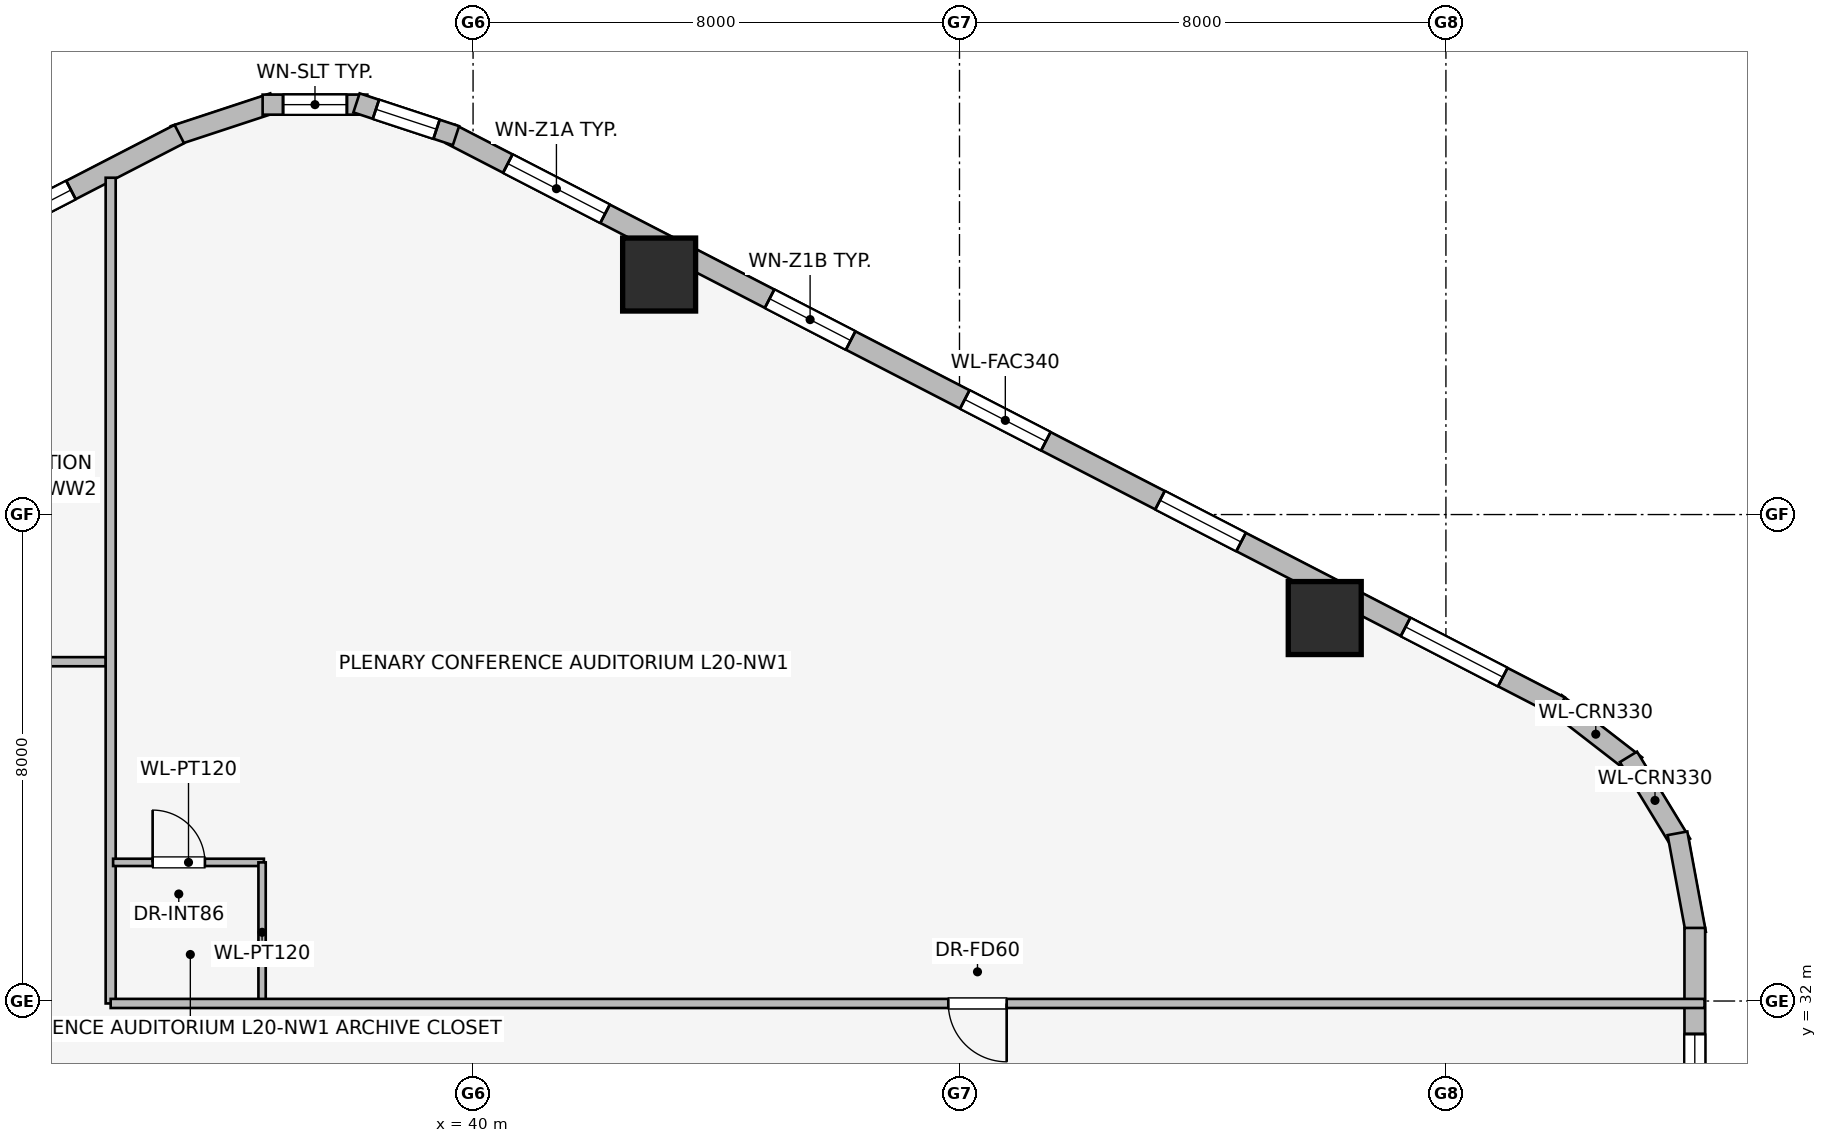
"""IFC4 building model, lengths in metres.
Left out: names, types, materials, properties, quantities, classifications, styles, units other than length and angle.
Written with IfcOpenShell. Run it as: python <this file> out.ifc"""

import sys

from ifc_helpers import new_model, si_unit, direction, frame, frame_2d, origin, origin_2d, place, context, subcontext, project, spatial, rectangle, extrude, element, fill, save


model = new_model("IFC4")
c1 = context("Model", 3, precision=1e-05, world=origin(), true_north=direction((0.0, 1.0)))
c2 = subcontext(c1, "Body", "Model", "MODEL_VIEW")
j1 = project(units=[si_unit("LENGTHUNIT", "METRE"), si_unit("PLANEANGLEUNIT", "RADIAN")], contexts=[c1])
p1 = place(None, origin())
s1 = spatial("IfcSite", under=j1, at=p1, CompositionType="ELEMENT")
p2 = place(p1, origin())
s2 = spatial("IfcBuilding", under=s1, at=p2, CompositionType="ELEMENT")
p3 = place(p2, frame((0.0, 0.0, 78.1)))
s3 = spatial("IfcBuildingStorey", under=s2, at=p3, CompositionType="ELEMENT", Elevation=78.1)
for number, where, z_axis, x_axis in (
    (1, (54.007, 38.298, 0.0), (0.0, 0.0, 1.0), (1.0, 0.0, 0.0)),
    (2, (43.06, 43.947, 0.0), (0.0, 0.0, 1.0), (1.0, 0.0, 0.0)),
):
    element("IfcColumn", number, at=place(p3, frame(where, z_axis=z_axis, x_axis=x_axis)), inside=s3, PredefinedType="COLUMN", context=c2, shape_type="SweptSolid", body=[
        extrude(rectangle(XDim=1.2, YDim=1.2, at=origin_2d()), origin(), (0.0, 0.0, 1.0), 3.65),
    ])
p4 = place(p3, frame((57.802, 36.901, 0.0), z_axis=(0.0, 0.0, 1.0), x_axis=(0.790691856293, -0.61221433207, 0.0)))
e3 = element("IfcWall", 3, at=p4, inside=s3, PredefinedType="STANDARD", context=c2, shape_type="SweptSolid", body=[
    extrude(rectangle(XDim=1.676, YDim=0.33, at=frame_2d((0.838, 0.0))), origin(), (0.0, 0.0, 1.0), 3.39),
])
p5 = place(p3, frame((59.002, 36.015, 0.0), z_axis=(0.0, 0.0, 1.0), x_axis=(0.520584129191, -0.853810379671, 0.0)))
e4 = element("IfcWall", 4, at=p5, inside=s3, PredefinedType="STANDARD", context=c2, shape_type="SweptSolid", body=[
    extrude(rectangle(XDim=1.677, YDim=0.33, at=frame_2d((0.838, 0.0))), origin(), (0.0, 0.0, 1.0), 3.39),
])
p6 = place(p3, frame((59.808, 34.758, 0.0), z_axis=(0.0, 0.0, 1.0), x_axis=(0.181714143354, -0.983351397063, 0.0)))
e5 = element("IfcWall", 5, at=p6, inside=s3, PredefinedType="STANDARD", context=c2, shape_type="SweptSolid", body=[
    extrude(rectangle(XDim=1.678, YDim=0.33, at=frame_2d((0.839, 0.0))), origin(), (0.0, 0.0, 1.0), 3.39),
])
p7 = place(p3, frame((39.631, 46.257, 0.0), z_axis=(0.0, 0.0, 1.0), x_axis=(0.888634413993, -0.458616264721, 0.0)))
e6 = element("IfcWall", 6, at=p7, inside=s3, PredefinedType="STANDARD", context=c2, shape_type="SweptSolid", body=[
    extrude(rectangle(XDim=20.531, YDim=0.34, at=frame_2d((10.266, 0.0))), origin(), (0.0, 0.0, 1.0), 2.684),
])
p8 = place(p7, frame((1.058, 0.0, 0.75)))
e7 = element("IfcOpeningElement", 7, at=p8, cuts=e6, PredefinedType="OPENING", context=c2, shape_type="SweptSolid", body=[
    extrude(rectangle(XDim=1.8, YDim=1.5, at=frame_2d((0.9, 0.75))), frame((0.0, 0.18, 0.0), z_axis=(0.0, -1.0, 0.0), x_axis=(1.0, 0.0, 0.0)), (0.0, 0.0, 1.0), 0.36),
])
p9 = place(p7, frame((5.903, 0.0, 0.75)))
e8 = element("IfcOpeningElement", 8, at=p9, cuts=e6, PredefinedType="OPENING", context=c2, shape_type="SweptSolid", body=[
    extrude(rectangle(XDim=1.5, YDim=1.5, at=frame_2d((0.75, 0.75))), frame((0.0, 0.18, 0.0), z_axis=(0.0, -1.0, 0.0), x_axis=(1.0, 0.0, 0.0)), (0.0, 0.0, 1.0), 0.36),
])
p10 = place(p7, frame((9.516, 0.0, 0.75)))
e9 = element("IfcOpeningElement", 9, at=p10, cuts=e6, PredefinedType="OPENING", context=c2, shape_type="SweptSolid", body=[
    extrude(rectangle(XDim=1.5, YDim=1.5, at=frame_2d((0.75, 0.75))), frame((0.0, 0.18, 0.0), z_axis=(0.0, -1.0, 0.0), x_axis=(1.0, 0.0, 0.0)), (0.0, 0.0, 1.0), 0.36),
])
p11 = place(p7, frame((13.129, 0.0, 0.75)))
e10 = element("IfcOpeningElement", 10, at=p11, cuts=e6, PredefinedType="OPENING", context=c2, shape_type="SweptSolid", body=[
    extrude(rectangle(XDim=1.5, YDim=1.5, at=frame_2d((0.75, 0.75))), frame((0.0, 0.18, 0.0), z_axis=(0.0, -1.0, 0.0), x_axis=(1.0, 0.0, 0.0)), (0.0, 0.0, 1.0), 0.36),
])
p12 = place(p7, frame((17.673, 0.0, 0.75)))
e11 = element("IfcOpeningElement", 11, at=p12, cuts=e6, PredefinedType="OPENING", context=c2, shape_type="SweptSolid", body=[
    extrude(rectangle(XDim=1.8, YDim=1.5, at=frame_2d((0.9, 0.75))), frame((0.0, 0.18, 0.0), z_axis=(0.0, -1.0, 0.0), x_axis=(1.0, 0.0, 0.0)), (0.0, 0.0, 1.0), 0.36),
])
p13 = place(p3, frame((35.081, 46.231, 0.0), z_axis=(0.0, 0.0, 1.0), x_axis=(0.94976901097, 0.312951794691, 0.0)))
e12 = element("IfcWall", 12, at=p13, inside=s3, PredefinedType="STANDARD", context=c2, shape_type="SweptSolid", body=[
    extrude(rectangle(XDim=1.722, YDim=0.33, at=frame_2d((0.861, 0.0))), origin(), (0.0, 0.0, 1.0), 3.39),
])
p14 = place(p3, frame((36.539, 46.741, 0.0), z_axis=(0.0, 0.0, 1.0), x_axis=(1.0, 0.0, 0.0)))
e13 = element("IfcWall", 13, at=p14, inside=s3, PredefinedType="STANDARD", context=c2, shape_type="SweptSolid", body=[
    extrude(rectangle(XDim=1.722, YDim=0.33, at=frame_2d((0.861, 0.0))), origin(), (0.0, 0.0, 1.0), 3.39),
])
p15 = place(p14, frame((0.336, 0.0, 0.75)))
e14 = element("IfcOpeningElement", 14, at=p15, cuts=e13, PredefinedType="OPENING", context=c2, shape_type="SweptSolid", body=[
    extrude(rectangle(XDim=1.05, YDim=1.4, at=frame_2d((0.525, 0.7))), frame((0.0, 0.175, 0.0), z_axis=(0.0, -1.0, 0.0), x_axis=(1.0, 0.0, 0.0)), (0.0, 0.0, 1.0), 0.35),
])
p16 = place(p3, frame((38.083, 46.77, 0.0), z_axis=(0.0, 0.0, 1.0), x_axis=(0.94976901097, -0.312951794691, 0.0)))
e15 = element("IfcWall", 15, at=p16, inside=s3, PredefinedType="STANDARD", context=c2, shape_type="SweptSolid", body=[
    extrude(rectangle(XDim=1.722, YDim=0.33, at=frame_2d((0.861, 0.0))), origin(), (0.0, 0.0, 1.0), 3.39),
])
p17 = place(p16, frame((0.336, 0.0, 0.75)))
e16 = element("IfcOpeningElement", 16, at=p17, cuts=e15, PredefinedType="OPENING", context=c2, shape_type="SweptSolid", body=[
    extrude(rectangle(XDim=1.05, YDim=1.4, at=frame_2d((0.525, 0.7))), frame((0.0, 0.175, 0.0), z_axis=(0.0, -1.0, 0.0), x_axis=(1.0, 0.0, 0.0)), (0.0, 0.0, 1.0), 0.35),
])
p18 = place(p3, frame((16.924, 36.841, 0.0), z_axis=(0.0, 0.0, 1.0), x_axis=(0.888634413993, 0.458616264721, 0.0)))
e17 = element("IfcWall", 17, at=p18, inside=s3, PredefinedType="STANDARD", context=c2, shape_type="SweptSolid", body=[
    extrude(rectangle(XDim=20.531, YDim=0.34, at=frame_2d((10.266, 0.0))), origin(), (0.0, 0.0, 1.0), 2.684),
])
p19 = place(p18, frame((5.197, 0.0, 0.75)))
e18 = element("IfcOpeningElement", 18, at=p19, cuts=e17, PredefinedType="OPENING", context=c2, shape_type="SweptSolid", body=[
    extrude(rectangle(XDim=1.8, YDim=1.5, at=frame_2d((0.9, 0.75))), frame((0.0, 0.18, 0.0), z_axis=(0.0, -1.0, 0.0), x_axis=(1.0, 0.0, 0.0)), (0.0, 0.0, 1.0), 0.36),
])
p20 = place(p18, frame((7.698, 0.0, 0.75)))
e19 = element("IfcOpeningElement", 19, at=p20, cuts=e17, PredefinedType="OPENING", context=c2, shape_type="SweptSolid", body=[
    extrude(rectangle(XDim=1.8, YDim=1.5, at=frame_2d((0.9, 0.75))), frame((0.0, 0.18, 0.0), z_axis=(0.0, -1.0, 0.0), x_axis=(1.0, 0.0, 0.0)), (0.0, 0.0, 1.0), 0.36),
])
p21 = place(p18, frame((11.101, 0.0, 0.75)))
e20 = element("IfcOpeningElement", 20, at=p21, cuts=e17, PredefinedType="OPENING", context=c2, shape_type="SweptSolid", body=[
    extrude(rectangle(XDim=1.5, YDim=1.5, at=frame_2d((0.75, 0.75))), frame((0.0, 0.18, 0.0), z_axis=(0.0, -1.0, 0.0), x_axis=(1.0, 0.0, 0.0)), (0.0, 0.0, 1.0), 0.36),
])
p22 = place(p18, frame((13.657, 0.0, 0.75)))
e21 = element("IfcOpeningElement", 21, at=p22, cuts=e17, PredefinedType="OPENING", context=c2, shape_type="SweptSolid", body=[
    extrude(rectangle(XDim=1.5, YDim=1.5, at=frame_2d((0.75, 0.75))), frame((0.0, 0.18, 0.0), z_axis=(0.0, -1.0, 0.0), x_axis=(1.0, 0.0, 0.0)), (0.0, 0.0, 1.0), 0.36),
])
p23 = place(p18, frame((17.476, 0.0, 0.75)))
e22 = element("IfcOpeningElement", 22, at=p23, cuts=e17, PredefinedType="OPENING", context=c2, shape_type="SweptSolid", body=[
    extrude(rectangle(XDim=1.05, YDim=1.4, at=frame_2d((0.525, 0.7))), frame((0.0, 0.18, 0.0), z_axis=(0.0, -1.0, 0.0), x_axis=(1.0, 0.0, 0.0)), (0.0, 0.0, 1.0), 0.36),
])
p24 = place(p3, frame((60.093, 33.202, 0.0), z_axis=(0.0, 0.0, 1.0), x_axis=(0.0, -1.0, 0.0)))
e23 = element("IfcWall", 23, at=p24, inside=s3, PredefinedType="STANDARD", context=c2, shape_type="SweptSolid", body=[
    extrude(rectangle(XDim=18.404, YDim=0.34, at=frame_2d((9.202, 0.0))), origin(), (0.0, 0.0, 1.0), 2.684),
])
p25 = place(p24, frame((1.744, 0.0, 0.75)))
e24 = element("IfcOpeningElement", 24, at=p25, cuts=e23, PredefinedType="OPENING", context=c2, shape_type="SweptSolid", body=[
    extrude(rectangle(XDim=1.05, YDim=1.4, at=frame_2d((0.525, 0.7))), frame((0.0, 0.18, 0.0), z_axis=(0.0, -1.0, 0.0), x_axis=(1.0, 0.0, 0.0)), (0.0, 0.0, 1.0), 0.36),
])
p26 = place(p24, frame((5.298, 0.0, 0.75)))
e25 = element("IfcOpeningElement", 25, at=p26, cuts=e23, PredefinedType="OPENING", context=c2, shape_type="SweptSolid", body=[
    extrude(rectangle(XDim=1.5, YDim=1.5, at=frame_2d((0.75, 0.75))), frame((0.0, 0.18, 0.0), z_axis=(0.0, -1.0, 0.0), x_axis=(1.0, 0.0, 0.0)), (0.0, 0.0, 1.0), 0.36),
])
p27 = place(p24, frame((8.793, 0.0, 0.75)))
e26 = element("IfcOpeningElement", 26, at=p27, cuts=e23, PredefinedType="OPENING", context=c2, shape_type="SweptSolid", body=[
    extrude(rectangle(XDim=1.05, YDim=1.4, at=frame_2d((0.525, 0.7))), frame((0.0, 0.18, 0.0), z_axis=(0.0, -1.0, 0.0), x_axis=(1.0, 0.0, 0.0)), (0.0, 0.0, 1.0), 0.36),
])
p28 = place(p24, frame((11.722, 0.0, 0.75)))
e27 = element("IfcOpeningElement", 27, at=p28, cuts=e23, PredefinedType="OPENING", context=c2, shape_type="SweptSolid", body=[
    extrude(rectangle(XDim=1.5, YDim=1.5, at=frame_2d((0.75, 0.75))), frame((0.0, 0.18, 0.0), z_axis=(0.0, -1.0, 0.0), x_axis=(1.0, 0.0, 0.0)), (0.0, 0.0, 1.0), 0.36),
])
p29 = place(p24, frame((15.65, 0.0, 0.75)))
e28 = element("IfcOpeningElement", 28, at=p29, cuts=e23, PredefinedType="OPENING", context=c2, shape_type="SweptSolid", body=[
    extrude(rectangle(XDim=1.05, YDim=1.4, at=frame_2d((0.525, 0.7))), frame((0.0, 0.18, 0.0), z_axis=(0.0, -1.0, 0.0), x_axis=(1.0, 0.0, 0.0)), (0.0, 0.0, 1.0), 0.36),
])
p30 = place(p3, frame((33.962, 37.58, 0.0), z_axis=(0.0, 0.0, 1.0), x_axis=(-1.0, 0.0, 0.0)))
e29 = element("IfcWall", 29, at=p30, inside=s3, PredefinedType="PARTITIONING", context=c2, shape_type="SweptSolid", body=[
    extrude(rectangle(XDim=7.904, YDim=0.15, at=frame_2d((3.952, 0.0))), origin(), (0.0, 0.0, 1.0), 3.39),
])
p31 = place(p30, frame((3.697, 0.0, 0.0)))
e30 = element("IfcOpeningElement", 30, at=p31, cuts=e29, PredefinedType="OPENING", context=c2, shape_type="SweptSolid", body=[
    extrude(rectangle(XDim=0.96, YDim=2.0, at=frame_2d((0.48, 1.0))), frame((0.0, 0.085, 0.0), z_axis=(0.0, -1.0, 0.0), x_axis=(1.0, 0.0, 0.0)), (0.0, 0.0, 1.0), 0.17),
])
p32 = place(p3, frame((34.04, 31.96, 0.0), z_axis=(0.0, 0.0, 1.0), x_axis=(0.0, 1.0, 0.0)))
e31 = element("IfcWall", 31, at=p32, inside=s3, PredefinedType="PARTITIONING", context=c2, shape_type="SweptSolid", body=[
    extrude(rectangle(XDim=13.579, YDim=0.165, at=frame_2d((6.79, 0.0))), origin(), (0.0, 0.0, 1.0), 3.39),
])
p33 = place(p3, frame((34.08, 34.28, 0.0), z_axis=(0.0, 0.0, 1.0), x_axis=(1.0, 0.0, 0.0)))
e32 = element("IfcWall", 32, at=p33, inside=s3, PredefinedType="PARTITIONING", context=c2, shape_type="SweptSolid", body=[
    extrude(rectangle(XDim=2.48, YDim=0.12, at=frame_2d((1.24, 0.0))), origin(), (0.0, 0.0, 1.0), 3.39),
])
p34 = place(p33, frame((0.65, 0.0, 0.0)))
e33 = element("IfcOpeningElement", 33, at=p34, cuts=e32, PredefinedType="OPENING", context=c2, shape_type="SweptSolid", body=[
    extrude(rectangle(XDim=0.86, YDim=2.0, at=frame_2d((0.43, 1.0))), frame((0.0, 0.07, 0.0), z_axis=(0.0, -1.0, 0.0), x_axis=(1.0, 0.0, 0.0)), (0.0, 0.0, 1.0), 0.14),
])
p35 = place(p3, frame((36.53, 31.98, 0.0), z_axis=(0.0, 0.0, 1.0), x_axis=(0.0, 1.0, 0.0)))
e34 = element("IfcWall", 34, at=p35, inside=s3, PredefinedType="PARTITIONING", context=c2, shape_type="SweptSolid", body=[
    extrude(rectangle(XDim=2.3, YDim=0.12, at=frame_2d((1.15, 0.0))), origin(), (0.0, 0.0, 1.0), 3.39),
])
p36 = place(p3, frame((60.253, 31.96, 0.0), z_axis=(0.0, 0.0, 1.0), x_axis=(-1.0, 0.0, 0.0)))
e35 = element("IfcWall", 35, at=p36, inside=s3, PredefinedType="PARTITIONING", context=c2, shape_type="SweptSolid", body=[
    extrude(rectangle(XDim=26.213, YDim=0.15, at=frame_2d((13.106, 0.0))), origin(), (0.0, 0.0, 1.0), 3.39),
])
p37 = place(p36, frame((11.477, 0.0, 0.0)))
e36 = element("IfcOpeningElement", 36, at=p37, cuts=e35, PredefinedType="OPENING", context=c2, shape_type="SweptSolid", body=[
    extrude(rectangle(XDim=0.96, YDim=2.0, at=frame_2d((0.48, 1.0))), frame((0.0, 0.085, 0.0), z_axis=(0.0, -1.0, 0.0), x_axis=(1.0, 0.0, 0.0)), (0.0, 0.0, 1.0), 0.17),
])
p38 = place(p8, origin())
e37 = element("IfcWindow", 37, at=p38, inside=s3, PartitioningType="SINGLE_PANEL", PredefinedType="WINDOW", context=c2, shape_type="SweptSolid", body=[
    extrude(rectangle(XDim=1.8, YDim=1.5, at=frame_2d((0.9, 0.75))), frame((0.0, 0.03, 0.0), z_axis=(0.0, -1.0, 0.0), x_axis=(1.0, 0.0, 0.0)), (0.0, 0.0, 1.0), 0.06),
])
fill(e7, e37)
p39 = place(p9, origin())
e38 = element("IfcWindow", 38, at=p39, inside=s3, PartitioningType="SINGLE_PANEL", PredefinedType="WINDOW", context=c2, shape_type="SweptSolid", body=[
    extrude(rectangle(XDim=1.5, YDim=1.5, at=frame_2d((0.75, 0.75))), frame((0.0, 0.03, 0.0), z_axis=(0.0, -1.0, 0.0), x_axis=(1.0, 0.0, 0.0)), (0.0, 0.0, 1.0), 0.06),
])
fill(e8, e38)
p40 = place(p10, origin())
e39 = element("IfcWindow", 39, at=p40, inside=s3, PartitioningType="SINGLE_PANEL", PredefinedType="WINDOW", context=c2, shape_type="SweptSolid", body=[
    extrude(rectangle(XDim=1.5, YDim=1.5, at=frame_2d((0.75, 0.75))), frame((0.0, 0.03, 0.0), z_axis=(0.0, -1.0, 0.0), x_axis=(1.0, 0.0, 0.0)), (0.0, 0.0, 1.0), 0.06),
])
fill(e9, e39)
p41 = place(p11, origin())
e40 = element("IfcWindow", 40, at=p41, inside=s3, PartitioningType="SINGLE_PANEL", PredefinedType="WINDOW", context=c2, shape_type="SweptSolid", body=[
    extrude(rectangle(XDim=1.5, YDim=1.5, at=frame_2d((0.75, 0.75))), frame((0.0, 0.03, 0.0), z_axis=(0.0, -1.0, 0.0), x_axis=(1.0, 0.0, 0.0)), (0.0, 0.0, 1.0), 0.06),
])
fill(e10, e40)
p42 = place(p12, origin())
e41 = element("IfcWindow", 41, at=p42, inside=s3, PartitioningType="SINGLE_PANEL", PredefinedType="WINDOW", context=c2, shape_type="SweptSolid", body=[
    extrude(rectangle(XDim=1.8, YDim=1.5, at=frame_2d((0.9, 0.75))), frame((0.0, 0.03, 0.0), z_axis=(0.0, -1.0, 0.0), x_axis=(1.0, 0.0, 0.0)), (0.0, 0.0, 1.0), 0.06),
])
fill(e11, e41)
p43 = place(p15, origin())
e42 = element("IfcWindow", 42, at=p43, inside=s3, PartitioningType="SINGLE_PANEL", PredefinedType="WINDOW", context=c2, shape_type="SweptSolid", body=[
    extrude(rectangle(XDim=1.05, YDim=1.4, at=frame_2d((0.525, 0.7))), frame((0.0, 0.03, 0.0), z_axis=(0.0, -1.0, 0.0), x_axis=(1.0, 0.0, 0.0)), (0.0, 0.0, 1.0), 0.06),
])
fill(e14, e42)
p44 = place(p17, origin())
e43 = element("IfcWindow", 43, at=p44, inside=s3, PartitioningType="SINGLE_PANEL", PredefinedType="WINDOW", context=c2, shape_type="SweptSolid", body=[
    extrude(rectangle(XDim=1.05, YDim=1.4, at=frame_2d((0.525, 0.7))), frame((0.0, 0.03, 0.0), z_axis=(0.0, -1.0, 0.0), x_axis=(1.0, 0.0, 0.0)), (0.0, 0.0, 1.0), 0.06),
])
fill(e16, e43)
p45 = place(p23, origin())
e44 = element("IfcWindow", 44, at=p45, inside=s3, PartitioningType="SINGLE_PANEL", PredefinedType="WINDOW", context=c2, shape_type="SweptSolid", body=[
    extrude(rectangle(XDim=1.05, YDim=1.4, at=frame_2d((0.525, 0.7))), frame((0.0, 0.03, 0.0), z_axis=(0.0, -1.0, 0.0), x_axis=(1.0, 0.0, 0.0)), (0.0, 0.0, 1.0), 0.06),
])
fill(e22, e44)
p46 = place(p25, origin())
e45 = element("IfcWindow", 45, at=p46, inside=s3, PartitioningType="SINGLE_PANEL", PredefinedType="WINDOW", context=c2, shape_type="SweptSolid", body=[
    extrude(rectangle(XDim=1.05, YDim=1.4, at=frame_2d((0.525, 0.7))), frame((0.0, 0.03, 0.0), z_axis=(0.0, -1.0, 0.0), x_axis=(1.0, 0.0, 0.0)), (0.0, 0.0, 1.0), 0.06),
])
fill(e24, e45)
p47 = place(p34, origin())
e46 = element("IfcDoor", 46, at=p47, inside=s3, OperationType="SINGLE_SWING_LEFT", PredefinedType="DOOR", context=c2, shape_type="SweptSolid", body=[
    extrude(rectangle(XDim=0.86, YDim=2.0, at=frame_2d((0.43, 1.0))), frame((0.0, 0.025, 0.0), z_axis=(0.0, -1.0, 0.0), x_axis=(1.0, 0.0, 0.0)), (0.0, 0.0, 1.0), 0.05),
])
fill(e33, e46)
p48 = place(p37, origin())
e47 = element("IfcDoor", 47, at=p48, inside=s3, OperationType="SINGLE_SWING_LEFT", PredefinedType="DOOR", context=c2, shape_type="SweptSolid", body=[
    extrude(rectangle(XDim=0.96, YDim=2.0, at=frame_2d((0.48, 1.0))), frame((0.0, 0.025, 0.0), z_axis=(0.0, -1.0, 0.0), x_axis=(1.0, 0.0, 0.0)), (0.0, 0.0, 1.0), 0.05),
])
fill(e36, e47)
save(model, sys.argv[1])
